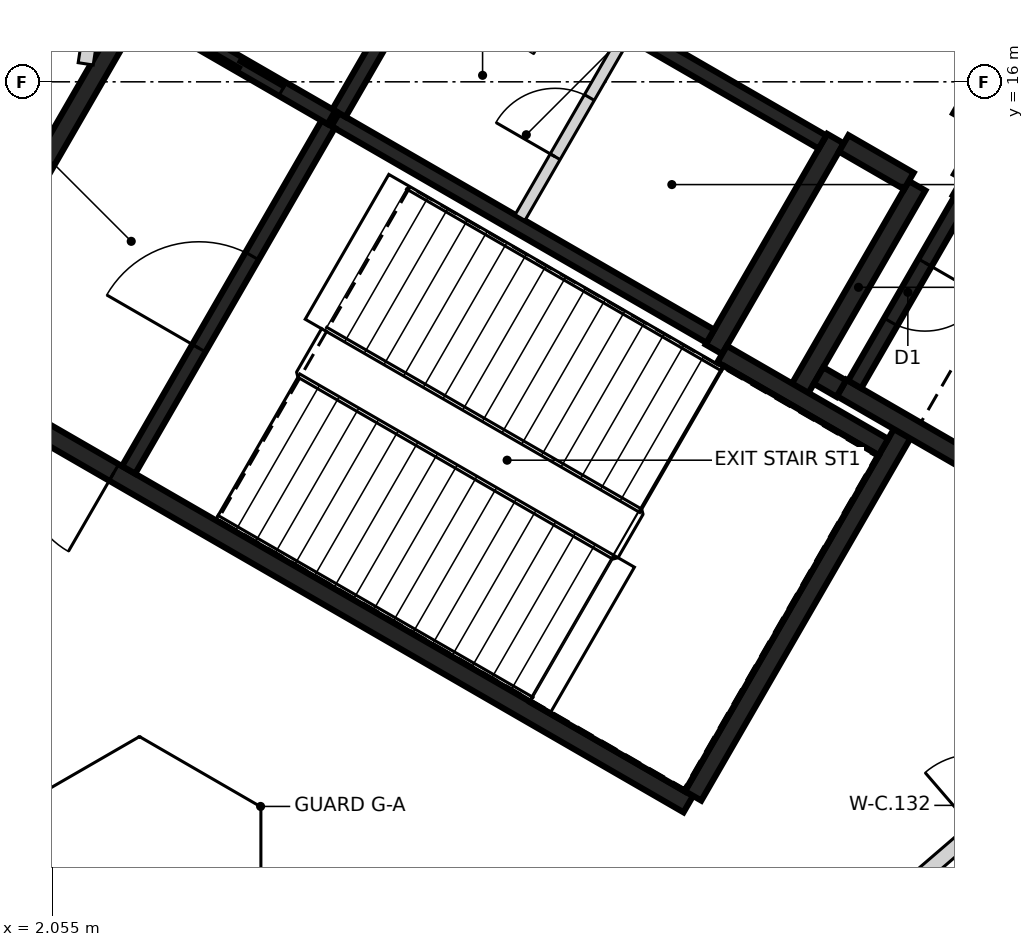
"""IFC4 building model, lengths in metres.
Left out: names, types, materials, properties, quantities, classifications, styles, units other than length and angle.
Written with IfcOpenShell. Run it as: python <this file> out.ifc"""

import sys

from ifc_helpers import new_model, si_unit, direction, frame, frame_2d, origin, place, context, subcontext, project, spatial, rectangle, extrude, element, fill, save


model = new_model("IFC4")
c1 = context("Model", 3, precision=1e-05, world=origin(), true_north=direction((0.0, 1.0)))
c2 = subcontext(c1, "Body", "Model", "MODEL_VIEW")
j1 = project(units=[si_unit("LENGTHUNIT", "METRE"), si_unit("PLANEANGLEUNIT", "RADIAN")], contexts=[c1])
p1 = place(None, origin())
s1 = spatial("IfcSite", under=j1, at=p1, CompositionType="ELEMENT")
p2 = place(p1, origin())
s2 = spatial("IfcBuilding", under=s1, at=p2, CompositionType="ELEMENT")
p3 = place(p2, frame((0.0, 0.0, 123.8)))
s3 = spatial("IfcBuildingStorey", under=s2, at=p3, CompositionType="ELEMENT", Elevation=123.8)
p4 = place(p3, frame((10.42, 6.498, 0.0), z_axis=(0.0, 0.0, 1.0), x_axis=(-0.866021906294, 0.500006057782, 0.0)))
e1 = element("IfcWall", 1, at=p4, inside=s3, PredefinedType="SHEAR", context=c2, shape_type="SweptSolid", body=[
    extrude(rectangle(XDim=11.55, YDim=0.25, at=frame_2d((5.775, 0.0))), origin(), (0.0, 0.0, 1.0), 4.6),
])
p5 = place(p4, frame((10.025, 0.0, 0.0)))
e2 = element("IfcOpeningElement", 2, at=p5, cuts=e1, PredefinedType="OPENING", context=c2, shape_type="SweptSolid", body=[
    extrude(rectangle(XDim=1.2, YDim=2.1, at=frame_2d((0.6, 1.05))), frame((0.0, 0.135, 0.0), z_axis=(0.0, -1.0, 0.0), x_axis=(1.0, 0.0, 0.0)), (0.0, 0.0, 1.0), 0.27),
])
p6 = place(p4, frame((8.725, 0.0, 0.0)))
e3 = element("IfcOpeningElement", 3, at=p6, cuts=e1, PredefinedType="OPENING", context=c2, shape_type="SweptSolid", body=[
    extrude(rectangle(XDim=1.2, YDim=2.1, at=frame_2d((0.6, 1.05))), frame((0.0, 0.135, 0.0), z_axis=(0.0, -1.0, 0.0), x_axis=(1.0, 0.0, 0.0)), (0.0, 0.0, 1.0), 0.27),
])
p7 = place(p3, frame((0.48, 12.381, 0.0), z_axis=(0.0, 0.0, 1.0), x_axis=(0.49999885962, 0.866026062182, 0.0)))
e4 = element("IfcWall", 4, at=p7, inside=s3, PredefinedType="SHEAR", context=c2, shape_type="SweptSolid", body=[
    extrude(rectangle(XDim=5.225, YDim=0.25, at=frame_2d((2.612, 0.0))), origin(), (0.0, 0.0, 1.0), 4.6),
])
p8 = place(p3, frame((13.238, 11.378, 0.0), z_axis=(0.0, 0.0, 1.0), x_axis=(-0.500008851346, -0.866020293397, 0.0)))
e5 = element("IfcWall", 5, at=p8, inside=s3, PredefinedType="SHEAR", context=c2, shape_type="SweptSolid", body=[
    extrude(rectangle(XDim=5.51, YDim=0.25, at=frame_2d((2.755, 0.0))), origin(), (0.0, 0.0, 1.0), 4.6),
])
p9 = place(p3, frame((12.357, 15.252, 0.0), z_axis=(0.0, 0.0, 1.0), x_axis=(-0.500028443584, -0.866008981251, 0.0)))
e6 = element("IfcWall", 6, at=p9, inside=s3, PredefinedType="SHEAR", context=c2, shape_type="SweptSolid", body=[
    extrude(rectangle(XDim=3.2, YDim=0.25, at=frame_2d((1.6, 0.0))), origin(), (0.0, 0.0, 1.0), 4.6),
])
p10 = place(p3, frame((14.918, 10.54, 0.0), z_axis=(0.0, 0.0, 1.0), x_axis=(-0.866063538972, 0.499933942099, 0.0)))
e7 = element("IfcWall", 7, at=p10, inside=s3, PredefinedType="SHEAR", context=c2, shape_type="SweptSolid", body=[
    extrude(rectangle(XDim=2.865, YDim=0.25, at=frame_2d((1.432, 0.0))), origin(), (0.0, 0.0, 1.0), 4.6),
])
p11 = place(p3, frame((13.963, 14.614, 0.0), z_axis=(0.0, 0.0, 1.0), x_axis=(0.866042235819, -0.499970844928, 0.0)))
e8 = element("IfcWall", 8, at=p11, inside=s3, PredefinedType="SHEAR", context=c2, shape_type="SweptSolid", body=[
    extrude(rectangle(XDim=2.865, YDim=0.25, at=frame_2d((1.432, 0.0))), origin(), (0.0, 0.0, 1.0), 4.6),
])
p12 = place(p3, frame((11.888, 11.961, 0.0), z_axis=(0.0, 0.0, 1.0), x_axis=(0.500003324108, 0.866023484601, 0.0)))
e9 = element("IfcWall", 9, at=p12, inside=s3, PredefinedType="SHEAR", context=c2, shape_type="SweptSolid", body=[
    extrude(rectangle(XDim=3.085, YDim=0.25, at=frame_2d((1.542, 0.0))), origin(), (0.0, 0.0, 1.0), 4.6),
])
p13 = place(p3, frame((10.865, 12.418, 0.0), z_axis=(0.0, 0.0, 1.0), x_axis=(0.866026229868, -0.499998569178, 0.0)))
e10 = element("IfcWall", 10, at=p13, inside=s3, PredefinedType="SHEAR", context=c2, shape_type="SweptSolid", body=[
    extrude(rectangle(XDim=2.449, YDim=0.25, at=frame_2d((1.225, 0.0))), origin(), (0.0, 0.0, 1.0), 4.6),
])
p14 = place(p3, frame((14.945, 17.135, 0.0), z_axis=(0.0, 0.0, 1.0), x_axis=(-0.499983108224, -0.866035156036, 0.0)))
e11 = element("IfcWall", 11, at=p14, inside=s3, PredefinedType="SHEAR", context=c2, shape_type="SweptSolid", body=[
    extrude(rectangle(XDim=1.865, YDim=0.25, at=frame_2d((0.932, 0.0))), origin(), (0.0, 0.0, 1.0), 4.6),
])
p15 = place(p14, frame((0.535, 0.0, 0.0)))
e12 = element("IfcOpeningElement", 12, at=p15, cuts=e11, PredefinedType="OPENING", context=c2, shape_type="SweptSolid", body=[
    extrude(rectangle(XDim=1.25, YDim=2.1, at=frame_2d((0.625, 1.05))), frame((0.0, 0.135, 0.0), z_axis=(0.0, -1.0, 0.0), x_axis=(1.0, 0.0, 0.0)), (0.0, 0.0, 1.0), 0.27),
])
p16 = place(p3, frame((13.322, 14.695, 0.0), z_axis=(0.0, 0.0, 1.0), x_axis=(-0.866017078145, 0.500014420154, 0.0)))
e13 = element("IfcWall", 13, at=p16, inside=s3, PredefinedType="SHEAR", context=c2, shape_type="SweptSolid", body=[
    extrude(rectangle(XDim=0.989, YDim=0.25, at=frame_2d((0.495, 0.0))), origin(), (0.0, 0.0, 1.0), 4.6),
])
p17 = place(p3, frame((14.368, 15.315, 0.0), z_axis=(0.0, 0.0, 1.0), x_axis=(-0.499897359611, -0.866084655132, 0.0)))
e14 = element("IfcWall", 14, at=p17, inside=s3, PredefinedType="SHEAR", context=c2, shape_type="SweptSolid", body=[
    extrude(rectangle(XDim=0.685, YDim=0.25, at=frame_2d((0.342, 0.0))), origin(), (0.0, 0.0, 1.0), 4.6),
])
p18 = place(p3, frame((12.433, 11.964, 0.0), z_axis=(0.0, 0.0, 1.0), x_axis=(-0.866055875208, 0.499947218231, 0.0)))
e15 = element("IfcWall", 15, at=p18, inside=s3, PredefinedType="SHEAR", context=c2, shape_type="SweptSolid", body=[
    extrude(rectangle(XDim=0.345, YDim=0.25, at=frame_2d((0.172, 0.0))), origin(), (0.0, 0.0, 1.0), 4.6),
])
p19 = place(p3, frame((5.775, 15.502, 0.0), z_axis=(0.0, 0.0, 1.0), x_axis=(0.866020080793, -0.500009219579, 0.0)))
e16 = element("IfcWall", 16, at=p19, inside=s3, PredefinedType="SHEAR", context=c2, shape_type="SweptSolid", body=[
    extrude(rectangle(XDim=5.699, YDim=0.2, at=frame_2d((2.85, 0.0))), origin(), (0.0, 0.0, 1.0), 4.6),
])
p20 = place(p3, frame((12.185, 15.207, 0.0), z_axis=(0.0, 0.0, 1.0), x_axis=(-0.866020080793, 0.500009219579, 0.0)))
e17 = element("IfcWall", 17, at=p20, inside=s3, PredefinedType="SHEAR", context=c2, shape_type="SweptSolid", body=[
    extrude(rectangle(XDim=5.699, YDim=0.2, at=frame_2d((2.85, 0.0))), origin(), (0.0, 0.0, 1.0), 4.6),
])
p21 = place(p20, frame((3.874, 0.0, 0.0)))
e18 = element("IfcOpeningElement", 18, at=p21, cuts=e17, PredefinedType="OPENING", context=c2, shape_type="SweptSolid", body=[
    extrude(rectangle(XDim=0.9, YDim=2.1, at=frame_2d((0.45, 1.05))), frame((0.0, 0.11, 0.0), z_axis=(0.0, -1.0, 0.0), x_axis=(1.0, 0.0, 0.0)), (0.0, 0.0, 1.0), 0.22),
])
p22 = place(p3, frame((3.057, 10.895, 0.0), z_axis=(0.0, 0.0, 1.0), x_axis=(0.499989418164, 0.866031513124, 0.0)))
e19 = element("IfcWall", 19, at=p22, inside=s3, PredefinedType="SHEAR", context=c2, shape_type="SweptSolid", body=[
    extrude(rectangle(XDim=5.251, YDim=0.2, at=frame_2d((2.625, 0.0))), origin(), (0.0, 0.0, 1.0), 4.6),
])
p23 = place(p22, frame((1.849, 0.0, 0.0)))
e20 = element("IfcOpeningElement", 20, at=p23, cuts=e19, PredefinedType="OPENING", context=c2, shape_type="SweptSolid", body=[
    extrude(rectangle(XDim=1.4, YDim=2.1, at=frame_2d((0.7, 1.05))), frame((0.0, 0.11, 0.0), z_axis=(0.0, -1.0, 0.0), x_axis=(1.0, 0.0, 0.0)), (0.0, 0.0, 1.0), 0.22),
])
p24 = place(p3, frame((14.008, 14.442, 0.0), z_axis=(0.0, 0.0, 1.0), x_axis=(-0.499986818241, -0.866033014143, 0.0)))
e21 = element("IfcWall", 21, at=p24, inside=s3, PredefinedType="SHEAR", context=c2, shape_type="SweptSolid", body=[
    extrude(rectangle(XDim=2.798, YDim=0.2, at=frame_2d((1.399, 0.0))), origin(), (0.0, 0.0, 1.0), 4.6),
])
p25 = place(p24, frame((0.949, 0.0, 0.0)))
e22 = element("IfcOpeningElement", 22, at=p25, cuts=e21, PredefinedType="OPENING", context=c2, shape_type="SweptSolid", body=[
    extrude(rectangle(XDim=0.9, YDim=2.1, at=frame_2d((0.45, 1.05))), frame((0.0, 0.11, 0.0), z_axis=(0.0, -1.0, 0.0), x_axis=(1.0, 0.0, 0.0)), (0.0, 0.0, 1.0), 0.22),
])
p26 = place(p3, frame((7.199, 17.97, 0.0), z_axis=(0.0, 0.0, 1.0), x_axis=(-0.499968400327, -0.866043647095, 0.0)))
e23 = element("IfcWall", 23, at=p26, inside=s3, PredefinedType="SHEAR", context=c2, shape_type="SweptSolid", body=[
    extrude(rectangle(XDim=2.75, YDim=0.2, at=frame_2d((1.375, 0.0))), origin(), (0.0, 0.0, 1.0), 4.6),
])
p27 = place(p3, frame((5.725, 15.531, 0.0), z_axis=(0.0, 0.0, 1.0), x_axis=(-0.866037306777, 0.499979382845, 0.0)))
e24 = element("IfcWall", 24, at=p27, inside=s3, PredefinedType="SHEAR", context=c2, shape_type="SweptSolid", body=[
    extrude(rectangle(XDim=2.742, YDim=0.2, at=frame_2d((1.371, 0.0))), origin(), (0.0, 0.0, 1.0), 4.6),
])
p28 = place(p27, frame((0.743, 0.0, 0.0)))
e25 = element("IfcOpeningElement", 25, at=p28, cuts=e24, PredefinedType="OPENING", context=c2, shape_type="SweptSolid", body=[
    extrude(rectangle(XDim=1.3, YDim=2.1, at=frame_2d((0.65, 1.05))), frame((0.0, 0.11, 0.0), z_axis=(0.0, -1.0, 0.0), x_axis=(1.0, 0.0, 0.0)), (0.0, 0.0, 1.0), 0.22),
])
p29 = place(p3, frame((8.207, 14.214, 0.0), z_axis=(0.0, 0.0, 1.0), x_axis=(0.499922376475, 0.866070215109, 0.0)))
e26 = element("IfcWall", 26, at=p29, inside=s3, PredefinedType="PARTITIONING", context=c2, shape_type="SweptSolid", body=[
    extrude(rectangle(XDim=2.749, YDim=0.15, at=frame_2d((1.374, 0.0))), origin(), (0.0, 0.0, 1.0), 4.6),
])
p30 = place(p29, frame((0.924, 0.0, 0.0)))
e27 = element("IfcOpeningElement", 27, at=p30, cuts=e26, PredefinedType="OPENING", context=c2, shape_type="SweptSolid", body=[
    extrude(rectangle(XDim=0.9, YDim=2.1, at=frame_2d((0.45, 1.05))), frame((0.0, 0.085, 0.0), z_axis=(0.0, -1.0, 0.0), x_axis=(1.0, 0.0, 0.0)), (0.0, 0.0, 1.0), 0.17),
])
p31 = place(p3, frame((12.187, 4.433, 0.0), z_axis=(0.0, 0.0, 1.0), x_axis=(0.757934867899, 0.652330235405, 0.0)))
e28 = element("IfcWall", 28, at=p31, inside=s3, PredefinedType="PARTITIONING", context=c2, shape_type="SweptSolid", body=[
    extrude(rectangle(XDim=6.279, YDim=0.2, at=frame_2d((3.14, 0.0))), origin(), (0.0, 0.0, 1.0), 4.6),
])
p32 = place(p31, frame((2.639, 0.0, 0.0)))
e29 = element("IfcOpeningElement", 29, at=p32, cuts=e28, PredefinedType="OPENING", context=c2, shape_type="SweptSolid", body=[
    extrude(rectangle(XDim=1.0, YDim=2.1, at=frame_2d((0.5, 1.05))), frame((0.0, 0.11, 0.0), z_axis=(0.0, -1.0, 0.0), x_axis=(1.0, 0.0, 0.0)), (0.0, 0.0, 1.0), 0.22),
])
p33 = place(p3, frame((2.492, 16.236, 0.0), z_axis=(0.0, 0.0, 1.0), x_axis=(0.151721108942, 0.988423343058, 0.0)))
e30 = element("IfcWall", 30, at=p33, inside=s3, PredefinedType="PARTITIONING", context=c2, shape_type="SweptSolid", body=[
    extrude(rectangle(XDim=9.444, YDim=0.2, at=frame_2d((4.722, 0.0))), origin(), (0.0, 0.0, 1.0), 4.6),
])
p34 = place(p28, origin())
e31 = element("IfcDoor", 31, at=p34, inside=s3, OperationType="SLIDING_TO_RIGHT", PredefinedType="DOOR", context=c2, shape_type="SweptSolid", body=[
    extrude(rectangle(XDim=1.3, YDim=2.1, at=frame_2d((0.65, 1.05))), frame((0.0, 0.025, 0.0), z_axis=(0.0, -1.0, 0.0), x_axis=(1.0, 0.0, 0.0)), (0.0, 0.0, 1.0), 0.05),
])
fill(e25, e31)
p35 = place(p6, origin())
e32 = element("IfcDoor", 32, at=p35, inside=s3, OperationType="SINGLE_SWING_RIGHT", PredefinedType="DOOR", context=c2, shape_type="SweptSolid", body=[
    extrude(rectangle(XDim=1.2, YDim=2.1, at=frame_2d((0.6, 1.05))), frame((0.0, 0.025, 0.0), z_axis=(0.0, -1.0, 0.0), x_axis=(1.0, 0.0, 0.0)), (0.0, 0.0, 1.0), 0.05),
])
fill(e3, e32)
p36 = place(p23, origin())
e33 = element("IfcDoor", 33, at=p36, inside=s3, OperationType="SINGLE_SWING_RIGHT", PredefinedType="DOOR", context=c2, shape_type="SweptSolid", body=[
    extrude(rectangle(XDim=1.4, YDim=2.1, at=frame_2d((0.7, 1.05))), frame((0.0, 0.025, 0.0), z_axis=(0.0, -1.0, 0.0), x_axis=(1.0, 0.0, 0.0)), (0.0, 0.0, 1.0), 0.05),
])
fill(e20, e33)
p37 = place(p25, origin())
e34 = element("IfcDoor", 34, at=p37, inside=s3, OperationType="SINGLE_SWING_RIGHT", PredefinedType="DOOR", context=c2, shape_type="SweptSolid", body=[
    extrude(rectangle(XDim=0.9, YDim=2.1, at=frame_2d((0.45, 1.05))), frame((0.0, 0.025, 0.0), z_axis=(0.0, -1.0, 0.0), x_axis=(1.0, 0.0, 0.0)), (0.0, 0.0, 1.0), 0.05),
])
fill(e22, e34)
p38 = place(p30, origin())
e35 = element("IfcDoor", 35, at=p38, inside=s3, OperationType="SINGLE_SWING_LEFT", PredefinedType="DOOR", context=c2, shape_type="SweptSolid", body=[
    extrude(rectangle(XDim=0.9, YDim=2.1, at=frame_2d((0.45, 1.05))), frame((0.0, 0.025, 0.0), z_axis=(0.0, -1.0, 0.0), x_axis=(1.0, 0.0, 0.0)), (0.0, 0.0, 1.0), 0.05),
])
fill(e27, e35)
save(model, sys.argv[1])
